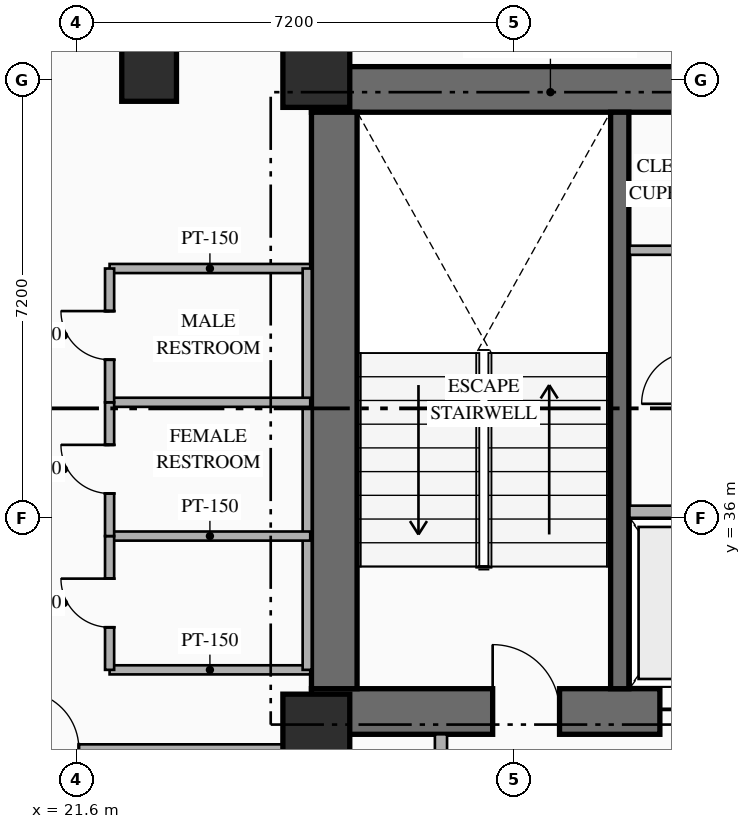
"""IFC4 building model, lengths in metres.
Left out: names, types, materials, properties, quantities, classifications, styles, units other than length and angle.
Written with IfcOpenShell. Run it as: python <this file> out.ifc"""

import sys

from ifc_helpers import new_model, si_unit, direction, frame, frame_2d, origin, origin_2d, place, context, subcontext, project, spatial, rectangle, hollow_rectangle, extrude, element, fill, save


model = new_model("IFC4")
c1 = context("Model", 3, precision=1e-05, world=origin(), true_north=direction((0.0, 1.0)))
c2 = subcontext(c1, "Body", "Model", "MODEL_VIEW")
j1 = project(units=[si_unit("LENGTHUNIT", "METRE"), si_unit("PLANEANGLEUNIT", "RADIAN")], contexts=[c1])
p1 = place(None, origin())
s1 = spatial("IfcSite", under=j1, at=p1, CompositionType="ELEMENT")
p2 = place(p1, origin())
s2 = spatial("IfcBuilding", under=s1, at=p2, CompositionType="ELEMENT")
p3 = place(p2, frame((0.0, 0.0, 84.65)))
s3 = spatial("IfcBuildingStorey", under=s2, at=p3, CompositionType="ELEMENT", Elevation=84.65)
p4 = place(p3, frame((25.47, 32.815, 0.0), z_axis=(0.0, 0.0, 1.0), x_axis=(1.0, 0.0, 0.0)))
e1 = element("IfcWall", 1, at=p4, inside=s3, PredefinedType="SHEAR", context=c2, shape_type="SweptSolid", body=[
    extrude(rectangle(XDim=8.08, YDim=0.75, at=frame_2d((4.04, 0.0))), origin(), (0.0, 0.0, 1.0), 3.35),
])
p5 = place(p4, frame((2.98, 0.0, 0.0)))
e2 = element("IfcOpeningElement", 2, at=p5, cuts=e1, PredefinedType="OPENING", context=c2, shape_type="SweptSolid", body=[
    extrude(rectangle(XDim=1.1, YDim=2.2, at=frame_2d((0.55, 1.1))), frame((0.0, 0.385, 0.0), z_axis=(0.0, -1.0, 0.0), x_axis=(1.0, 0.0, 0.0)), (0.0, 0.0, 1.0), 0.77),
])
p6 = place(p4, frame((5.73, 0.0, 0.0)))
e3 = element("IfcOpeningElement", 3, at=p6, cuts=e1, PredefinedType="OPENING", context=c2, shape_type="SweptSolid", body=[
    extrude(rectangle(XDim=1.1, YDim=2.15, at=frame_2d((0.55, 1.075))), frame((0.0, 0.385, 0.0), z_axis=(0.0, -1.0, 0.0), x_axis=(1.0, 0.0, 0.0)), (0.0, 0.0, 1.0), 0.77),
])
p7 = place(p3, frame((25.47, 43.045, 0.0), z_axis=(0.0, 0.0, 1.0), x_axis=(1.0, 0.0, 0.0)))
e4 = element("IfcWall", 4, at=p7, inside=s3, PredefinedType="SHEAR", context=c2, shape_type="SweptSolid", body=[
    extrude(rectangle(XDim=8.08, YDim=0.75, at=frame_2d((4.04, 0.0))), origin(), (0.0, 0.0, 1.0), 3.35),
])
p8 = place(p3, frame((25.845, 33.19, 0.0), z_axis=(0.0, 0.0, 1.0), x_axis=(0.0, 1.0, 0.0)))
e5 = element("IfcWall", 5, at=p8, inside=s3, PredefinedType="SHEAR", context=c2, shape_type="SweptSolid", body=[
    extrude(rectangle(XDim=9.48, YDim=0.75, at=frame_2d((4.74, 0.0))), origin(), (0.0, 0.0, 1.0), 3.35),
])
p9 = place(p3, frame((30.54, 33.19, 0.0), z_axis=(0.0, 0.0, 1.0), x_axis=(0.0, 1.0, 0.0)))
e6 = element("IfcWall", 6, at=p9, inside=s3, PredefinedType="SHEAR", context=c2, shape_type="SweptSolid", body=[
    extrude(rectangle(XDim=9.48, YDim=0.3, at=frame_2d((4.74, 0.0))), origin(), (0.0, 0.0, 1.0), 3.35),
])
for number, where, z_axis, x_axis in (
    (7, (25.55, 32.55, 0.0), (0.0, 0.0, 1.0), (1.0, 0.0, 0.0)),
    (8, (25.55, 43.3, 0.0), (0.0, 0.0, 1.0), (1.0, 0.0, 0.0)),
):
    element("IfcColumn", number, at=place(p3, frame(where, z_axis=z_axis, x_axis=x_axis)), inside=s3, PredefinedType="COLUMN", context=c2, shape_type="SweptSolid", body=[
        extrude(rectangle(XDim=1.1, YDim=1.1, at=origin_2d()), origin(), (0.0, 0.0, 1.0), 3.35),
    ])
p10 = place(p3, frame((22.8, 43.3, 0.0), z_axis=(0.0, 0.0, 1.0), x_axis=(1.0, 0.0, 0.0)))
e9 = element("IfcColumn", 9, at=p10, inside=s3, PredefinedType="COLUMN", context=c2, shape_type="SweptSolid", body=[
    extrude(hollow_rectangle(XDim=0.9, YDim=0.9, WallThickness=0.036, at=origin_2d()), origin(), (0.0, 0.0, 1.0), 3.35),
])
p11 = place(p3, frame((30.7, 36.1, 0.0), z_axis=(0.0, 0.0, 1.0), x_axis=(1.0, 0.0, 0.0)))
e10 = element("IfcWall", 10, at=p11, inside=s3, PredefinedType="STANDARD", context=c2, shape_type="SweptSolid", body=[
    extrude(rectangle(XDim=2.1, YDim=0.2, at=frame_2d((1.05, 0.0))), origin(), (0.0, 0.0, 1.0), 3.13),
])
p12 = place(p3, frame((30.7, 40.4, 0.0), z_axis=(0.0, 0.0, 1.0), x_axis=(1.0, 0.0, 0.0)))
e11 = element("IfcWall", 11, at=p12, inside=s3, PredefinedType="PARTITIONING", context=c2, shape_type="SweptSolid", body=[
    extrude(rectangle(XDim=2.1, YDim=0.15, at=frame_2d((1.05, 0.0))), origin(), (0.0, 0.0, 1.0), 3.13),
])
p13 = place(p3, frame((27.6, 29.2, 0.0), z_axis=(0.0, 0.0, 1.0), x_axis=(0.0, 1.0, 0.0)))
e12 = element("IfcWall", 12, at=p13, inside=s3, PredefinedType="STANDARD", context=c2, shape_type="SweptSolid", body=[
    extrude(rectangle(XDim=3.24, YDim=0.2, at=frame_2d((1.62, 0.0))), origin(), (0.0, 0.0, 1.0), 3.13),
])
for number, where, z_axis, x_axis in (
    (13, (22.15, 33.5, 0.0), (0.0, 0.0, 1.0), (1.0, 0.0, 0.0)),
    (14, (22.15, 40.1, 0.0), (0.0, 0.0, 1.0), (1.0, 0.0, 0.0)),
):
    element("IfcWall", number, at=place(p3, frame(where, z_axis=z_axis, x_axis=x_axis)), inside=s3, PredefinedType="PARTITIONING", context=c2, shape_type="SweptSolid", body=[
        extrude(rectangle(XDim=3.3, YDim=0.15, at=frame_2d((1.65, 0.0))), origin(), (0.0, 0.0, 1.0), 3.13),
    ])
p14 = place(p3, frame((25.4, 33.5, 0.0), z_axis=(0.0, 0.0, 1.0), x_axis=(0.0, 1.0, 0.0)))
e15 = element("IfcWall", 15, at=p14, inside=s3, PredefinedType="PARTITIONING", context=c2, shape_type="SweptSolid", body=[
    extrude(rectangle(XDim=6.6, YDim=0.15, at=frame_2d((3.3, 0.0))), origin(), (0.0, 0.0, 1.0), 3.13),
])
for number, where, z_axis, x_axis in (
    (16, (22.15, 35.7, 0.0), (0.0, 0.0, 1.0), (1.0, 0.0, 0.0)),
    (17, (22.15, 37.9, 0.0), (0.0, 0.0, 1.0), (1.0, 0.0, 0.0)),
):
    element("IfcWall", number, at=place(p3, frame(where, z_axis=z_axis, x_axis=x_axis)), inside=s3, PredefinedType="PARTITIONING", context=c2, shape_type="SweptSolid", body=[
        extrude(rectangle(XDim=3.3, YDim=0.15, at=frame_2d((1.65, 0.0))), origin(), (0.0, 0.0, 1.0), 3.13),
    ])
p15 = place(p3, frame((22.15, 33.5, 0.0), z_axis=(0.0, 0.0, 1.0), x_axis=(0.0, 1.0, 0.0)))
e18 = element("IfcWall", 18, at=p15, inside=s3, PredefinedType="PARTITIONING", context=c2, shape_type="SweptSolid", body=[
    extrude(rectangle(XDim=2.2, YDim=0.15, at=frame_2d((1.1, 0.0))), origin(), (0.0, 0.0, 1.0), 3.13),
])
p16 = place(p15, frame((0.7, 0.0, 0.0)))
e19 = element("IfcOpeningElement", 19, at=p16, cuts=e18, PredefinedType="OPENING", context=c2, shape_type="SweptSolid", body=[
    extrude(rectangle(XDim=0.8, YDim=2.06, at=frame_2d((0.4, 1.03))), frame((0.0, 0.085, 0.0), z_axis=(0.0, -1.0, 0.0), x_axis=(1.0, 0.0, 0.0)), (0.0, 0.0, 1.0), 0.17),
])
p17 = place(p3, frame((22.15, 35.7, 0.0), z_axis=(0.0, 0.0, 1.0), x_axis=(0.0, 1.0, 0.0)))
e20 = element("IfcWall", 20, at=p17, inside=s3, PredefinedType="PARTITIONING", context=c2, shape_type="SweptSolid", body=[
    extrude(rectangle(XDim=2.2, YDim=0.15, at=frame_2d((1.1, 0.0))), origin(), (0.0, 0.0, 1.0), 3.13),
])
p18 = place(p17, frame((0.7, 0.0, 0.0)))
e21 = element("IfcOpeningElement", 21, at=p18, cuts=e20, PredefinedType="OPENING", context=c2, shape_type="SweptSolid", body=[
    extrude(rectangle(XDim=0.8, YDim=2.06, at=frame_2d((0.4, 1.03))), frame((0.0, 0.085, 0.0), z_axis=(0.0, -1.0, 0.0), x_axis=(1.0, 0.0, 0.0)), (0.0, 0.0, 1.0), 0.17),
])
p19 = place(p3, frame((22.15, 37.9, 0.0), z_axis=(0.0, 0.0, 1.0), x_axis=(0.0, 1.0, 0.0)))
e22 = element("IfcWall", 22, at=p19, inside=s3, PredefinedType="PARTITIONING", context=c2, shape_type="SweptSolid", body=[
    extrude(rectangle(XDim=2.2, YDim=0.15, at=frame_2d((1.1, 0.0))), origin(), (0.0, 0.0, 1.0), 3.13),
])
p20 = place(p19, frame((0.7, 0.0, 0.0)))
e23 = element("IfcOpeningElement", 23, at=p20, cuts=e22, PredefinedType="OPENING", context=c2, shape_type="SweptSolid", body=[
    extrude(rectangle(XDim=0.8, YDim=2.06, at=frame_2d((0.4, 1.03))), frame((0.0, 0.085, 0.0), z_axis=(0.0, -1.0, 0.0), x_axis=(1.0, 0.0, 0.0)), (0.0, 0.0, 1.0), 0.17),
])
p21 = place(p3, frame((19.95, 32.2, 0.0), z_axis=(0.0, 0.0, 1.0), x_axis=(1.0, 0.0, 0.0)))
e24 = element("IfcWall", 24, at=p21, inside=s3, PredefinedType="PARTITIONING", context=c2, shape_type="SweptSolid", body=[
    extrude(rectangle(XDim=5.35, YDim=0.15, at=frame_2d((2.675, 0.0))), origin(), (0.0, 0.0, 1.0), 3.13),
])
p22 = place(p21, frame((0.744, 0.0, 0.0)))
e25 = element("IfcOpeningElement", 25, at=p22, cuts=e24, PredefinedType="OPENING", context=c2, shape_type="SweptSolid", body=[
    extrude(rectangle(XDim=0.95, YDim=2.15, at=frame_2d((0.475, 1.075))), frame((0.0, 0.085, 0.0), z_axis=(0.0, -1.0, 0.0), x_axis=(1.0, 0.0, 0.0)), (0.0, 0.0, 1.0), 0.17),
])
p23 = place(p5, origin())
e26 = element("IfcDoor", 26, at=p23, inside=s3, OperationType="SINGLE_SWING_LEFT", PredefinedType="DOOR", context=c2, shape_type="SweptSolid", body=[
    extrude(rectangle(XDim=1.1, YDim=2.2, at=frame_2d((0.55, 1.1))), frame((0.0, 0.025, 0.0), z_axis=(0.0, -1.0, 0.0), x_axis=(1.0, 0.0, 0.0)), (0.0, 0.0, 1.0), 0.05),
])
fill(e2, e26)
p24 = place(p6, origin())
e27 = element("IfcDoor", 27, at=p24, inside=s3, OperationType="SLIDING_TO_LEFT", PredefinedType="USERDEFINED", context=c2, shape_type="SweptSolid", body=[
    extrude(rectangle(XDim=1.1, YDim=2.15, at=frame_2d((0.55, 1.075))), frame((0.0, 0.025, 0.0), z_axis=(0.0, -1.0, 0.0), x_axis=(1.0, 0.0, 0.0)), (0.0, 0.0, 1.0), 0.05),
])
fill(e3, e27)
p25 = place(p16, origin())
e28 = element("IfcDoor", 28, at=p25, inside=s3, OperationType="SINGLE_SWING_RIGHT", PredefinedType="DOOR", context=c2, shape_type="SweptSolid", body=[
    extrude(rectangle(XDim=0.8, YDim=2.06, at=frame_2d((0.4, 1.03))), frame((0.0, 0.025, 0.0), z_axis=(0.0, -1.0, 0.0), x_axis=(1.0, 0.0, 0.0)), (0.0, 0.0, 1.0), 0.05),
])
fill(e19, e28)
p26 = place(p18, origin())
e29 = element("IfcDoor", 29, at=p26, inside=s3, OperationType="SINGLE_SWING_RIGHT", PredefinedType="DOOR", context=c2, shape_type="SweptSolid", body=[
    extrude(rectangle(XDim=0.8, YDim=2.06, at=frame_2d((0.4, 1.03))), frame((0.0, 0.025, 0.0), z_axis=(0.0, -1.0, 0.0), x_axis=(1.0, 0.0, 0.0)), (0.0, 0.0, 1.0), 0.05),
])
fill(e21, e29)
p27 = place(p20, origin())
e30 = element("IfcDoor", 30, at=p27, inside=s3, OperationType="SINGLE_SWING_RIGHT", PredefinedType="DOOR", context=c2, shape_type="SweptSolid", body=[
    extrude(rectangle(XDim=0.8, YDim=2.06, at=frame_2d((0.4, 1.03))), frame((0.0, 0.025, 0.0), z_axis=(0.0, -1.0, 0.0), x_axis=(1.0, 0.0, 0.0)), (0.0, 0.0, 1.0), 0.05),
])
fill(e23, e30)
p28 = place(p22, origin())
e31 = element("IfcDoor", 31, at=p28, inside=s3, OperationType="SINGLE_SWING_LEFT", PredefinedType="DOOR", context=c2, shape_type="SweptSolid", body=[
    extrude(rectangle(XDim=0.95, YDim=2.15, at=frame_2d((0.475, 1.075))), frame((0.0, 0.025, 0.0), z_axis=(0.0, -1.0, 0.0), x_axis=(1.0, 0.0, 0.0)), (0.0, 0.0, 1.0), 0.05),
])
fill(e25, e31)
save(model, sys.argv[1])
